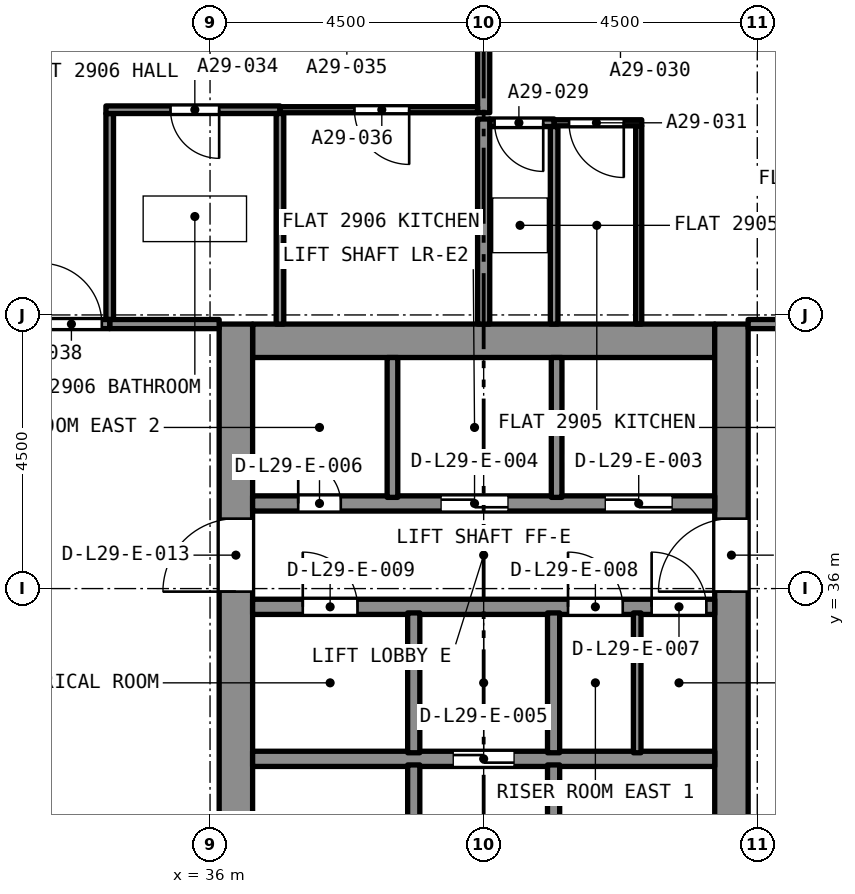
"""IFC4 building model, lengths in metres.
Left out: names, types, materials, properties, quantities, classifications, styles, units other than length and angle.
Written with IfcOpenShell. Run it as: python <this file> out.ifc"""

import sys

from ifc_helpers import new_model, si_unit, direction, frame, frame_2d, origin, place, context, subcontext, project, spatial, rectangle, extrude, element, fill, save


model = new_model("IFC4")
c1 = context("Model", 3, precision=1e-05, world=origin(), true_north=direction((0.0, 1.0)))
c2 = subcontext(c1, "Body", "Model", "MODEL_VIEW")
j1 = project(units=[si_unit("LENGTHUNIT", "METRE"), si_unit("PLANEANGLEUNIT", "RADIAN")], contexts=[c1])
p1 = place(None, origin())
s1 = spatial("IfcSite", under=j1, at=p1, CompositionType="ELEMENT")
p2 = place(p1, origin())
s2 = spatial("IfcBuilding", under=s1, at=p2, CompositionType="ELEMENT")
p3 = place(p2, frame((0.0, 0.0, 105.6)))
s3 = spatial("IfcBuildingStorey", under=s2, at=p3, CompositionType="ELEMENT", Elevation=105.6)
p4 = place(p3, frame((36.7, 40.075, 0.0), z_axis=(0.0, 0.0, 1.0), x_axis=(1.0, 0.0, 0.0)))
e1 = element("IfcWall", 1, at=p4, inside=s3, PredefinedType="SOLIDWALL", context=c2, shape_type="SweptSolid", body=[
    extrude(rectangle(XDim=7.6, YDim=0.55, at=frame_2d((3.8, 0.0))), origin(), (0.0, 0.0, 1.0), 3.2),
])
p5 = place(p3, frame((36.425, 27.15, 0.0), z_axis=(0.0, 0.0, 1.0), x_axis=(0.0, 1.0, 0.0)))
e2 = element("IfcWall", 2, at=p5, inside=s3, PredefinedType="SOLIDWALL", context=c2, shape_type="SweptSolid", body=[
    extrude(rectangle(XDim=13.2, YDim=0.55, at=frame_2d((6.6, 0.0))), origin(), (0.0, 0.0, 1.0), 3.2),
])
p6 = place(p5, frame((8.8, 0.0, 0.0)))
e3 = element("IfcOpeningElement", 3, at=p6, cuts=e2, PredefinedType="OPENING", context=c2, shape_type="SweptSolid", body=[
    extrude(rectangle(XDim=1.2, YDim=2.1, at=frame_2d((0.6, 1.05))), frame((0.0, 0.285, 0.0), z_axis=(0.0, -1.0, 0.0), x_axis=(1.0, 0.0, 0.0)), (0.0, 0.0, 1.0), 0.57),
])
p7 = place(p3, frame((44.575, 27.15, 0.0), z_axis=(0.0, 0.0, 1.0), x_axis=(0.0, 1.0, 0.0)))
e4 = element("IfcWall", 4, at=p7, inside=s3, PredefinedType="SOLIDWALL", context=c2, shape_type="SweptSolid", body=[
    extrude(rectangle(XDim=13.2, YDim=0.55, at=frame_2d((6.6, 0.0))), origin(), (0.0, 0.0, 1.0), 3.2),
])
p8 = place(p7, frame((8.8, 0.0, 0.0)))
e5 = element("IfcOpeningElement", 5, at=p8, cuts=e4, PredefinedType="OPENING", context=c2, shape_type="SweptSolid", body=[
    extrude(rectangle(XDim=1.2, YDim=2.1, at=frame_2d((0.6, 1.05))), frame((0.0, 0.285, 0.0), z_axis=(0.0, -1.0, 0.0), x_axis=(1.0, 0.0, 0.0)), (0.0, 0.0, 1.0), 0.57),
])
p9 = place(p3, frame((41.659, 43.66, 0.0), z_axis=(0.0, 0.0, 1.0), x_axis=(-1.0, 0.0, 0.0)))
e6 = element("IfcWall", 6, at=p9, inside=s3, PredefinedType="PARTITIONING", context=c2, shape_type="SweptSolid", body=[
    extrude(rectangle(XDim=1.059, YDim=0.125, at=frame_2d((0.53, 0.0))), origin(), (0.0, 0.0, 1.0), 2.9),
])
p10 = place(p9, frame((0.179, 0.0, 0.0)))
e7 = element("IfcOpeningElement", 7, at=p10, cuts=e6, PredefinedType="OPENING", context=c2, shape_type="SweptSolid", body=[
    extrude(rectangle(XDim=0.8, YDim=2.1, at=frame_2d((0.4, 1.05))), frame((0.0, 0.073, 0.0), z_axis=(0.0, -1.0, 0.0), x_axis=(1.0, 0.0, 0.0)), (0.0, 0.0, 1.0), 0.145),
])
p11 = place(p3, frame((41.659, 40.35, 0.0), z_axis=(0.0, 0.0, 1.0), x_axis=(0.0, 1.0, 0.0)))
e8 = element("IfcWall", 8, at=p11, inside=s3, PredefinedType="PARTITIONING", context=c2, shape_type="SweptSolid", body=[
    extrude(rectangle(XDim=3.247, YDim=0.125, at=frame_2d((1.624, 0.0))), origin(), (0.0, 0.0, 1.0), 2.9),
])
p12 = place(p3, frame((40.5, 40.35, 0.0), z_axis=(0.0, 0.0, 1.0), x_axis=(0.0, 1.0, 0.0)))
e9 = element("IfcWall", 9, at=p12, inside=s3, PredefinedType="PARTITIONING", context=c2, shape_type="SweptSolid", body=[
    extrude(rectangle(XDim=3.372, YDim=0.2, at=frame_2d((1.686, 0.0))), origin(), (0.0, 0.0, 1.0), 2.9),
])
p13 = place(p3, frame((43.05, 40.35, 0.0), z_axis=(0.0, 0.0, 1.0), x_axis=(0.0, 1.0, 0.0)))
e10 = element("IfcWall", 10, at=p13, inside=s3, PredefinedType="PARTITIONING", context=c2, shape_type="SweptSolid", body=[
    extrude(rectangle(XDim=3.26, YDim=0.1, at=frame_2d((1.63, 0.0))), origin(), (0.0, 0.0, 1.0), 2.9),
])
p14 = place(p3, frame((43.1, 43.66, 0.0), z_axis=(0.0, 0.0, 1.0), x_axis=(-1.0, 0.0, 0.0)))
e11 = element("IfcWall", 11, at=p14, inside=s3, PredefinedType="PARTITIONING", context=c2, shape_type="SweptSolid", body=[
    extrude(rectangle(XDim=1.441, YDim=0.1, at=frame_2d((0.72, 0.0))), origin(), (0.0, 0.0, 1.0), 2.9),
])
p15 = place(p14, frame((0.295, 0.0, 0.0)))
e12 = element("IfcOpeningElement", 12, at=p15, cuts=e11, PredefinedType="OPENING", context=c2, shape_type="SweptSolid", body=[
    extrude(rectangle(XDim=0.9, YDim=2.1, at=frame_2d((0.45, 1.05))), frame((0.0, 0.06, 0.0), z_axis=(0.0, -1.0, 0.0), x_axis=(1.0, 0.0, 0.0)), (0.0, 0.0, 1.0), 0.12),
])
p16 = place(p3, frame((40.5, 43.825, 0.0), z_axis=(0.0, 0.0, 1.0), x_axis=(0.0, 1.0, 0.0)))
e13 = element("IfcWall", 13, at=p16, inside=s3, PredefinedType="PARTITIONING", context=c2, shape_type="SweptSolid", body=[
    extrude(rectangle(XDim=5.1, YDim=0.2, at=frame_2d((2.55, 0.0))), origin(), (0.0, 0.0, 1.0), 2.9),
])
p17 = place(p3, frame((44.85, 40.35, 0.0), z_axis=(0.0, 0.0, 1.0), x_axis=(1.0, 0.0, 0.0)))
e14 = element("IfcWall", 14, at=p17, inside=s3, PredefinedType="PARTITIONING", context=c2, shape_type="SweptSolid", body=[
    extrude(rectangle(XDim=4.075, YDim=0.15, at=frame_2d((2.038, 0.0))), origin(), (0.0, 0.0, 1.0), 2.9),
])
p18 = place(p17, frame((1.9, 0.0, 0.0)))
e15 = element("IfcOpeningElement", 15, at=p18, cuts=e14, PredefinedType="OPENING", context=c2, shape_type="SweptSolid", body=[
    extrude(rectangle(XDim=1.0, YDim=2.1, at=frame_2d((0.5, 1.05))), frame((0.0, 0.085, 0.0), z_axis=(0.0, -1.0, 0.0), x_axis=(1.0, 0.0, 0.0)), (0.0, 0.0, 1.0), 0.17),
])
p19 = place(p3, frame((34.35, 40.425, 0.0), z_axis=(0.0, 0.0, 1.0), x_axis=(0.0, 1.0, 0.0)))
e16 = element("IfcWall", 16, at=p19, inside=s3, PredefinedType="PARTITIONING", context=c2, shape_type="SweptSolid", body=[
    extrude(rectangle(XDim=3.387, YDim=0.125, at=frame_2d((1.694, 0.0))), origin(), (0.0, 0.0, 1.0), 2.9),
])
p20 = place(p3, frame((37.15, 43.875, 0.0), z_axis=(0.0, 0.0, 1.0), x_axis=(-1.0, 0.0, 0.0)))
e17 = element("IfcWall", 17, at=p20, inside=s3, PredefinedType="PARTITIONING", context=c2, shape_type="SweptSolid", body=[
    extrude(rectangle(XDim=2.862, YDim=0.125, at=frame_2d((1.431, 0.0))), origin(), (0.0, 0.0, 1.0), 2.9),
])
p21 = place(p20, frame((1.0, 0.0, 0.0)))
e18 = element("IfcOpeningElement", 18, at=p21, cuts=e17, PredefinedType="OPENING", context=c2, shape_type="SweptSolid", body=[
    extrude(rectangle(XDim=0.8, YDim=2.1, at=frame_2d((0.4, 1.05))), frame((0.0, 0.073, 0.0), z_axis=(0.0, -1.0, 0.0), x_axis=(1.0, 0.0, 0.0)), (0.0, 0.0, 1.0), 0.145),
])
p22 = place(p3, frame((37.15, 40.35, 0.0), z_axis=(0.0, 0.0, 1.0), x_axis=(0.0, 1.0, 0.0)))
e19 = element("IfcWall", 19, at=p22, inside=s3, PredefinedType="PARTITIONING", context=c2, shape_type="SweptSolid", body=[
    extrude(rectangle(XDim=3.462, YDim=0.125, at=frame_2d((1.731, 0.0))), origin(), (0.0, 0.0, 1.0), 2.9),
])
p23 = place(p3, frame((34.35, 40.35, 0.0), z_axis=(0.0, 0.0, 1.0), x_axis=(1.0, 0.0, 0.0)))
e20 = element("IfcWall", 20, at=p23, inside=s3, PredefinedType="PARTITIONING", context=c2, shape_type="SweptSolid", body=[
    extrude(rectangle(XDim=1.8, YDim=0.15, at=frame_2d((0.9, 0.0))), origin(), (0.0, 0.0, 1.0), 2.9),
])
p24 = place(p3, frame((40.4, 43.875, 0.0), z_axis=(0.0, 0.0, 1.0), x_axis=(-1.0, 0.0, 0.0)))
e21 = element("IfcWall", 21, at=p24, inside=s3, PredefinedType="PARTITIONING", context=c2, shape_type="SweptSolid", body=[
    extrude(rectangle(XDim=3.25, YDim=0.1, at=frame_2d((1.625, 0.0))), origin(), (0.0, 0.0, 1.0), 2.9),
])
p25 = place(p24, frame((1.125, 0.0, 0.0)))
e22 = element("IfcOpeningElement", 22, at=p25, cuts=e21, PredefinedType="OPENING", context=c2, shape_type="SweptSolid", body=[
    extrude(rectangle(XDim=0.9, YDim=2.1, at=frame_2d((0.45, 1.05))), frame((0.0, 0.06, 0.0), z_axis=(0.0, -1.0, 0.0), x_axis=(1.0, 0.0, 0.0)), (0.0, 0.0, 1.0), 0.12),
])
p26 = place(p3, frame((32.075, 40.35, 0.0), z_axis=(0.0, 0.0, 1.0), x_axis=(1.0, 0.0, 0.0)))
e23 = element("IfcWall", 23, at=p26, inside=s3, PredefinedType="PARTITIONING", context=c2, shape_type="SweptSolid", body=[
    extrude(rectangle(XDim=2.275, YDim=0.15, at=frame_2d((1.138, 0.0))), origin(), (0.0, 0.0, 1.0), 2.9),
])
p27 = place(p26, frame((1.145, 0.0, 0.0)))
e24 = element("IfcOpeningElement", 24, at=p27, cuts=e23, PredefinedType="OPENING", context=c2, shape_type="SweptSolid", body=[
    extrude(rectangle(XDim=1.0, YDim=2.1, at=frame_2d((0.5, 1.05))), frame((0.0, 0.085, 0.0), z_axis=(0.0, -1.0, 0.0), x_axis=(1.0, 0.0, 0.0)), (0.0, 0.0, 1.0), 0.17),
])
p28 = place(p3, frame((36.7, 33.2, 0.0), z_axis=(0.0, 0.0, 1.0), x_axis=(1.0, 0.0, 0.0)))
e25 = element("IfcWall", 25, at=p28, inside=s3, PredefinedType="SOLIDWALL", context=c2, shape_type="SweptSolid", body=[
    extrude(rectangle(XDim=7.6, YDim=0.25, at=frame_2d((3.8, 0.0))), origin(), (0.0, 0.0, 1.0), 2.9),
])
p29 = place(p28, frame((3.3, 0.0, 0.0)))
e26 = element("IfcOpeningElement", 26, at=p29, cuts=e25, PredefinedType="OPENING", context=c2, shape_type="SweptSolid", body=[
    extrude(rectangle(XDim=1.0, YDim=2.1, at=frame_2d((0.5, 1.05))), frame((0.0, 0.135, 0.0), z_axis=(0.0, -1.0, 0.0), x_axis=(1.0, 0.0, 0.0)), (0.0, 0.0, 1.0), 0.27),
])
p30 = place(p3, frame((36.7, 35.7, 0.0), z_axis=(0.0, 0.0, 1.0), x_axis=(1.0, 0.0, 0.0)))
e27 = element("IfcWall", 27, at=p30, inside=s3, PredefinedType="SOLIDWALL", context=c2, shape_type="SweptSolid", body=[
    extrude(rectangle(XDim=7.6, YDim=0.25, at=frame_2d((3.8, 0.0))), origin(), (0.0, 0.0, 1.0), 2.9),
])
p31 = place(p30, frame((6.562, 0.0, 0.0)))
e28 = element("IfcOpeningElement", 28, at=p31, cuts=e27, PredefinedType="OPENING", context=c2, shape_type="SweptSolid", body=[
    extrude(rectangle(XDim=0.9, YDim=2.1, at=frame_2d((0.45, 1.05))), frame((0.0, 0.135, 0.0), z_axis=(0.0, -1.0, 0.0), x_axis=(1.0, 0.0, 0.0)), (0.0, 0.0, 1.0), 0.27),
])
p32 = place(p30, frame((5.188, 0.0, 0.0)))
e29 = element("IfcOpeningElement", 29, at=p32, cuts=e27, PredefinedType="OPENING", context=c2, shape_type="SweptSolid", body=[
    extrude(rectangle(XDim=0.9, YDim=2.1, at=frame_2d((0.45, 1.05))), frame((0.0, 0.135, 0.0), z_axis=(0.0, -1.0, 0.0), x_axis=(1.0, 0.0, 0.0)), (0.0, 0.0, 1.0), 0.27),
])
p33 = place(p30, frame((0.825, 0.0, 0.0)))
e30 = element("IfcOpeningElement", 30, at=p33, cuts=e27, PredefinedType="OPENING", context=c2, shape_type="SweptSolid", body=[
    extrude(rectangle(XDim=0.9, YDim=2.1, at=frame_2d((0.45, 1.05))), frame((0.0, 0.135, 0.0), z_axis=(0.0, -1.0, 0.0), x_axis=(1.0, 0.0, 0.0)), (0.0, 0.0, 1.0), 0.27),
])
p34 = place(p3, frame((36.7, 37.4, 0.0), z_axis=(0.0, 0.0, 1.0), x_axis=(1.0, 0.0, 0.0)))
e31 = element("IfcWall", 31, at=p34, inside=s3, PredefinedType="SOLIDWALL", context=c2, shape_type="SweptSolid", body=[
    extrude(rectangle(XDim=7.6, YDim=0.25, at=frame_2d((3.8, 0.0))), origin(), (0.0, 0.0, 1.0), 2.9),
])
p35 = place(p34, frame((5.8, 0.0, 0.0)))
e32 = element("IfcOpeningElement", 32, at=p35, cuts=e31, PredefinedType="OPENING", context=c2, shape_type="SweptSolid", body=[
    extrude(rectangle(XDim=1.1, YDim=2.4, at=frame_2d((0.55, 1.2))), frame((0.0, 0.135, 0.0), z_axis=(0.0, -1.0, 0.0), x_axis=(1.0, 0.0, 0.0)), (0.0, 0.0, 1.0), 0.27),
])
p36 = place(p34, frame((3.1, 0.0, 0.0)))
e33 = element("IfcOpeningElement", 33, at=p36, cuts=e31, PredefinedType="OPENING", context=c2, shape_type="SweptSolid", body=[
    extrude(rectangle(XDim=1.1, YDim=2.4, at=frame_2d((0.55, 1.2))), frame((0.0, 0.135, 0.0), z_axis=(0.0, -1.0, 0.0), x_axis=(1.0, 0.0, 0.0)), (0.0, 0.0, 1.0), 0.27),
])
p37 = place(p34, frame((0.75, 0.0, 0.0)))
e34 = element("IfcOpeningElement", 34, at=p37, cuts=e31, PredefinedType="OPENING", context=c2, shape_type="SweptSolid", body=[
    extrude(rectangle(XDim=0.7, YDim=2.1, at=frame_2d((0.35, 1.05))), frame((0.0, 0.135, 0.0), z_axis=(0.0, -1.0, 0.0), x_axis=(1.0, 0.0, 0.0)), (0.0, 0.0, 1.0), 0.27),
])
p38 = place(p3, frame((41.65, 27.7, 0.0), z_axis=(0.0, 0.0, 1.0), x_axis=(0.0, 1.0, 0.0)))
e35 = element("IfcWall", 35, at=p38, inside=s3, PredefinedType="SOLIDWALL", context=c2, shape_type="SweptSolid", body=[
    extrude(rectangle(XDim=5.4, YDim=0.2, at=frame_2d((2.7, 0.0))), origin(), (0.0, 0.0, 1.0), 2.9),
])
p39 = place(p38, frame((0.2, 0.0, 0.0)))
e36 = element("IfcOpeningElement", 36, at=p39, cuts=e35, PredefinedType="OPENING", context=c2, shape_type="SweptSolid", body=[
    extrude(rectangle(XDim=0.9, YDim=2.1, at=frame_2d((0.45, 1.05))), frame((0.0, 0.11, 0.0), z_axis=(0.0, -1.0, 0.0), x_axis=(1.0, 0.0, 0.0)), (0.0, 0.0, 1.0), 0.22),
])
p40 = place(p3, frame((39.35, 27.7, 0.0), z_axis=(0.0, 0.0, 1.0), x_axis=(0.0, 1.0, 0.0)))
e37 = element("IfcWall", 37, at=p40, inside=s3, PredefinedType="SOLIDWALL", context=c2, shape_type="SweptSolid", body=[
    extrude(rectangle(XDim=5.4, YDim=0.2, at=frame_2d((2.7, 0.0))), origin(), (0.0, 0.0, 1.0), 2.9),
])
p41 = place(p40, frame((0.2, 0.0, 0.0)))
e38 = element("IfcOpeningElement", 38, at=p41, cuts=e37, PredefinedType="OPENING", context=c2, shape_type="SweptSolid", body=[
    extrude(rectangle(XDim=0.9, YDim=2.1, at=frame_2d((0.45, 1.05))), frame((0.0, 0.11, 0.0), z_axis=(0.0, -1.0, 0.0), x_axis=(1.0, 0.0, 0.0)), (0.0, 0.0, 1.0), 0.22),
])
for number, where, z_axis, x_axis in (
    (39, (41.65, 33.3, 0.0), (0.0, 0.0, 1.0), (0.0, 1.0, 0.0)),
    (40, (39.35, 33.3, 0.0), (0.0, 0.0, 1.0), (0.0, 1.0, 0.0)),
):
    element("IfcWall", number, at=place(p3, frame(where, z_axis=z_axis, x_axis=x_axis)), inside=s3, PredefinedType="SOLIDWALL", context=c2, shape_type="SweptSolid", body=[
        extrude(rectangle(XDim=2.3, YDim=0.2, at=frame_2d((1.15, 0.0))), origin(), (0.0, 0.0, 1.0), 2.9),
    ])
for number, where, z_axis, x_axis in (
    (41, (41.7, 37.5, 0.0), (0.0, 0.0, 1.0), (0.0, 1.0, 0.0)),
    (42, (39.0, 37.5, 0.0), (0.0, 0.0, 1.0), (0.0, 1.0, 0.0)),
):
    element("IfcWall", number, at=place(p3, frame(where, z_axis=z_axis, x_axis=x_axis)), inside=s3, PredefinedType="SOLIDWALL", context=c2, shape_type="SweptSolid", body=[
        extrude(rectangle(XDim=2.3, YDim=0.175, at=frame_2d((1.15, 0.0))), origin(), (0.0, 0.0, 1.0), 2.9),
    ])
p42 = place(p3, frame((43.025, 33.3, 0.0), z_axis=(0.0, 0.0, 1.0), x_axis=(0.0, 1.0, 0.0)))
e43 = element("IfcWall", 43, at=p42, inside=s3, PredefinedType="PARTITIONING", context=c2, shape_type="SweptSolid", body=[
    extrude(rectangle(XDim=2.3, YDim=0.125, at=frame_2d((1.15, 0.0))), origin(), (0.0, 0.0, 1.0), 2.9),
])
p43 = place(p10, origin())
e44 = element("IfcDoor", 44, at=p43, inside=s3, OperationType="SINGLE_SWING_RIGHT", PredefinedType="DOOR", context=c2, shape_type="SweptSolid", body=[
    extrude(rectangle(XDim=0.8, YDim=2.1, at=frame_2d((0.4, 1.05))), frame((0.0, 0.025, 0.0), z_axis=(0.0, -1.0, 0.0), x_axis=(1.0, 0.0, 0.0)), (0.0, 0.0, 1.0), 0.05),
])
fill(e7, e44)
p44 = place(p15, origin())
e45 = element("IfcDoor", 45, at=p44, inside=s3, OperationType="SINGLE_SWING_RIGHT", PredefinedType="DOOR", context=c2, shape_type="SweptSolid", body=[
    extrude(rectangle(XDim=0.9, YDim=2.1, at=frame_2d((0.45, 1.05))), frame((0.0, 0.025, 0.0), z_axis=(0.0, -1.0, 0.0), x_axis=(1.0, 0.0, 0.0)), (0.0, 0.0, 1.0), 0.05),
])
fill(e12, e45)
p45 = place(p21, origin())
e46 = element("IfcDoor", 46, at=p45, inside=s3, OperationType="SINGLE_SWING_LEFT", PredefinedType="DOOR", context=c2, shape_type="SweptSolid", body=[
    extrude(rectangle(XDim=0.8, YDim=2.1, at=frame_2d((0.4, 1.05))), frame((0.0, 0.025, 0.0), z_axis=(0.0, -1.0, 0.0), x_axis=(1.0, 0.0, 0.0)), (0.0, 0.0, 1.0), 0.05),
])
fill(e18, e46)
p46 = place(p25, origin())
e47 = element("IfcDoor", 47, at=p46, inside=s3, OperationType="SINGLE_SWING_LEFT", PredefinedType="DOOR", context=c2, shape_type="SweptSolid", body=[
    extrude(rectangle(XDim=0.9, YDim=2.1, at=frame_2d((0.45, 1.05))), frame((0.0, 0.025, 0.0), z_axis=(0.0, -1.0, 0.0), x_axis=(1.0, 0.0, 0.0)), (0.0, 0.0, 1.0), 0.05),
])
fill(e22, e47)
p47 = place(p27, origin())
e48 = element("IfcDoor", 48, at=p47, inside=s3, OperationType="SINGLE_SWING_RIGHT", PredefinedType="DOOR", context=c2, shape_type="SweptSolid", body=[
    extrude(rectangle(XDim=1.0, YDim=2.1, at=frame_2d((0.5, 1.05))), frame((0.0, 0.025, 0.0), z_axis=(0.0, -1.0, 0.0), x_axis=(1.0, 0.0, 0.0)), (0.0, 0.0, 1.0), 0.05),
])
fill(e24, e48)
p48 = place(p35, origin())
e49 = element("IfcDoor", 49, at=p48, inside=s3, OperationType="SLIDING_TO_LEFT", PredefinedType="DOOR", context=c2, shape_type="SweptSolid", body=[
    extrude(rectangle(XDim=1.1, YDim=2.4, at=frame_2d((0.55, 1.2))), frame((0.0, 0.025, 0.0), z_axis=(0.0, -1.0, 0.0), x_axis=(1.0, 0.0, 0.0)), (0.0, 0.0, 1.0), 0.05),
])
fill(e32, e49)
p49 = place(p36, origin())
e50 = element("IfcDoor", 50, at=p49, inside=s3, OperationType="SLIDING_TO_LEFT", PredefinedType="DOOR", context=c2, shape_type="SweptSolid", body=[
    extrude(rectangle(XDim=1.1, YDim=2.4, at=frame_2d((0.55, 1.2))), frame((0.0, 0.025, 0.0), z_axis=(0.0, -1.0, 0.0), x_axis=(1.0, 0.0, 0.0)), (0.0, 0.0, 1.0), 0.05),
])
fill(e33, e50)
p50 = place(p29, origin())
e51 = element("IfcDoor", 51, at=p50, inside=s3, OperationType="SLIDING_TO_LEFT", PredefinedType="DOOR", context=c2, shape_type="SweptSolid", body=[
    extrude(rectangle(XDim=1.0, YDim=2.1, at=frame_2d((0.5, 1.05))), frame((0.0, 0.025, 0.0), z_axis=(0.0, -1.0, 0.0), x_axis=(1.0, 0.0, 0.0)), (0.0, 0.0, 1.0), 0.05),
])
fill(e26, e51)
p51 = place(p37, origin())
e52 = element("IfcDoor", 52, at=p51, inside=s3, OperationType="SINGLE_SWING_LEFT", PredefinedType="DOOR", context=c2, shape_type="SweptSolid", body=[
    extrude(rectangle(XDim=0.7, YDim=2.1, at=frame_2d((0.35, 1.05))), frame((0.0, 0.025, 0.0), z_axis=(0.0, -1.0, 0.0), x_axis=(1.0, 0.0, 0.0)), (0.0, 0.0, 1.0), 0.05),
])
fill(e34, e52)
p52 = place(p31, origin())
e53 = element("IfcDoor", 53, at=p52, inside=s3, OperationType="SINGLE_SWING_LEFT", PredefinedType="DOOR", context=c2, shape_type="SweptSolid", body=[
    extrude(rectangle(XDim=0.9, YDim=2.1, at=frame_2d((0.45, 1.05))), frame((0.0, 0.025, 0.0), z_axis=(0.0, -1.0, 0.0), x_axis=(1.0, 0.0, 0.0)), (0.0, 0.0, 1.0), 0.05),
])
fill(e28, e53)
p53 = place(p32, origin())
e54 = element("IfcDoor", 54, at=p53, inside=s3, OperationType="SINGLE_SWING_LEFT", PredefinedType="DOOR", context=c2, shape_type="SweptSolid", body=[
    extrude(rectangle(XDim=0.9, YDim=2.1, at=frame_2d((0.45, 1.05))), frame((0.0, 0.025, 0.0), z_axis=(0.0, -1.0, 0.0), x_axis=(1.0, 0.0, 0.0)), (0.0, 0.0, 1.0), 0.05),
])
fill(e29, e54)
p54 = place(p33, origin())
e55 = element("IfcDoor", 55, at=p54, inside=s3, OperationType="SINGLE_SWING_LEFT", PredefinedType="DOOR", context=c2, shape_type="SweptSolid", body=[
    extrude(rectangle(XDim=0.9, YDim=2.1, at=frame_2d((0.45, 1.05))), frame((0.0, 0.025, 0.0), z_axis=(0.0, -1.0, 0.0), x_axis=(1.0, 0.0, 0.0)), (0.0, 0.0, 1.0), 0.05),
])
fill(e30, e55)
p55 = place(p6, origin())
e56 = element("IfcDoor", 56, at=p55, inside=s3, OperationType="SINGLE_SWING_LEFT", PredefinedType="DOOR", context=c2, shape_type="SweptSolid", body=[
    extrude(rectangle(XDim=1.2, YDim=2.1, at=frame_2d((0.6, 1.05))), frame((0.0, 0.025, 0.0), z_axis=(0.0, -1.0, 0.0), x_axis=(1.0, 0.0, 0.0)), (0.0, 0.0, 1.0), 0.05),
])
fill(e3, e56)
p56 = place(p8, origin())
e57 = element("IfcDoor", 57, at=p56, inside=s3, OperationType="SINGLE_SWING_LEFT", PredefinedType="DOOR", context=c2, shape_type="SweptSolid", body=[
    extrude(rectangle(XDim=1.2, YDim=2.1, at=frame_2d((0.6, 1.05))), frame((0.0, 0.025, 0.0), z_axis=(0.0, -1.0, 0.0), x_axis=(1.0, 0.0, 0.0)), (0.0, 0.0, 1.0), 0.05),
])
fill(e5, e57)
save(model, sys.argv[1])
